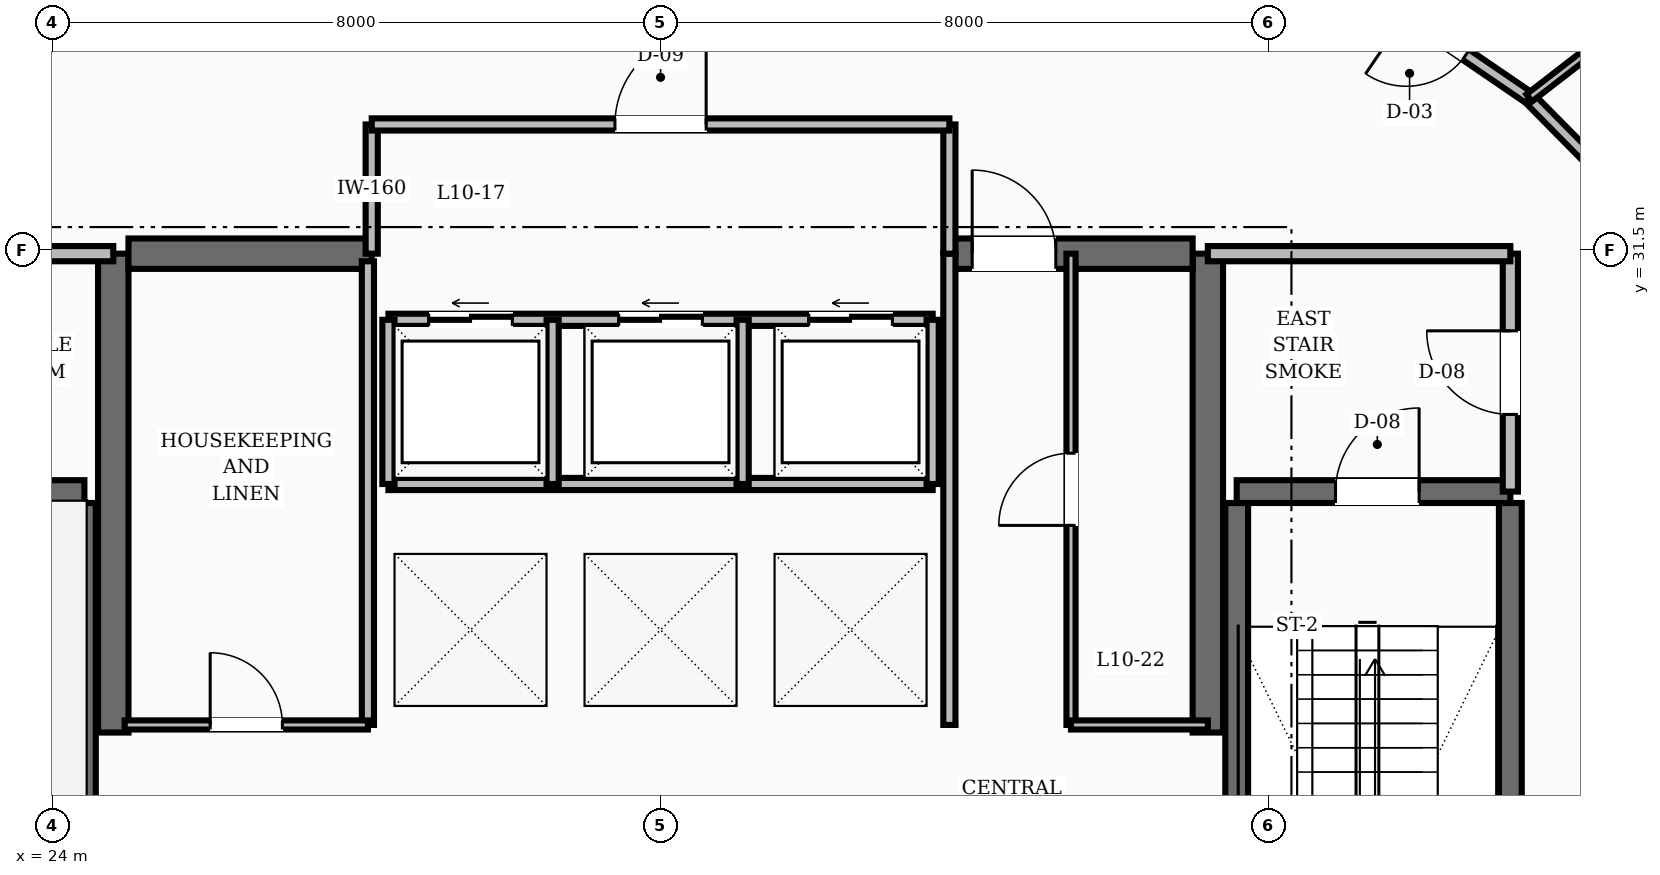
"""IFC4 building model, lengths in metres.
Left out: names, types, materials, properties, quantities, classifications, styles, units other than length and angle.
Written with IfcOpenShell. Run it as: python <this file> out.ifc"""

import sys

from ifc_helpers import new_model, si_unit, direction, frame, frame_2d, origin, place, context, subcontext, project, spatial, rectangle, extrude, element, fill, save


model = new_model("IFC4")
c1 = context("Model", 3, precision=1e-05, world=origin(), true_north=direction((0.0, 1.0)))
c2 = subcontext(c1, "Body", "Model", "MODEL_VIEW")
j1 = project(units=[si_unit("LENGTHUNIT", "METRE"), si_unit("PLANEANGLEUNIT", "RADIAN")], contexts=[c1])
p1 = place(None, origin())
s1 = spatial("IfcSite", under=j1, at=p1, CompositionType="ELEMENT")
p2 = place(p1, origin())
s2 = spatial("IfcBuilding", under=s1, at=p2, CompositionType="ELEMENT")
p3 = place(p2, frame((0.0, 0.0, 44.8)))
s3 = spatial("IfcBuildingStorey", under=s2, at=p3, CompositionType="ELEMENT", Elevation=44.8)
for number, where, z_axis, x_axis in (
    (1, (24.8, 25.15, 0.0), (0.0, 0.0, 1.0), (0.0, 1.0, 0.0)),
    (2, (39.2, 25.15, 0.0), (0.0, 0.0, 1.0), (0.0, 1.0, 0.0)),
):
    element("IfcWall", number, at=place(p3, frame(where, z_axis=z_axis, x_axis=x_axis)), inside=s3, PredefinedType="SHEAR", context=c2, shape_type="SweptSolid", body=[
        extrude(rectangle(XDim=6.3, YDim=0.4, at=frame_2d((3.15, 0.0))), origin(), (0.0, 0.0, 1.0), 3.6),
    ])
p4 = place(p3, frame((25.0, 31.45, 0.0), z_axis=(0.0, 0.0, 1.0), x_axis=(1.0, 0.0, 0.0)))
e3 = element("IfcWall", 3, at=p4, inside=s3, PredefinedType="SHEAR", context=c2, shape_type="SweptSolid", body=[
    extrude(rectangle(XDim=3.2, YDim=0.4, at=frame_2d((1.6, 0.0))), origin(), (0.0, 0.0, 1.0), 3.6),
])
p5 = place(p3, frame((35.8, 31.45, 0.0), z_axis=(0.0, 0.0, 1.0), x_axis=(1.0, 0.0, 0.0)))
e4 = element("IfcWall", 4, at=p5, inside=s3, PredefinedType="SHEAR", context=c2, shape_type="SweptSolid", body=[
    extrude(rectangle(XDim=3.2, YDim=0.4, at=frame_2d((1.6, 0.0))), origin(), (0.0, 0.0, 1.0), 3.6),
])
p6 = place(p5, frame((0.3, 0.0, 0.0)))
e5 = element("IfcOpeningElement", 5, at=p6, cuts=e4, PredefinedType="OPENING", context=c2, shape_type="SweptSolid", body=[
    extrude(rectangle(XDim=1.1, YDim=2.1, at=frame_2d((0.55, 1.05))), frame((0.0, 0.21, 0.0), z_axis=(0.0, -1.0, 0.0), x_axis=(1.0, 0.0, 0.0)), (0.0, 0.0, 1.0), 0.42),
])
p7 = place(p3, frame((24.42, 19.43, 0.0), z_axis=(0.0, 0.0, 1.0), x_axis=(0.0, 1.0, 0.0)))
e6 = element("IfcWall", 6, at=p7, inside=s3, PredefinedType="SHEAR", context=c2, shape_type="SweptSolid", body=[
    extrude(rectangle(XDim=8.74, YDim=0.3, at=frame_2d((4.37, 0.0))), origin(), (0.0, 0.0, 1.0), 3.6),
])
p8 = place(p3, frame((20.82, 28.32, 0.0), z_axis=(0.0, 0.0, 1.0), x_axis=(1.0, 0.0, 0.0)))
e7 = element("IfcWall", 7, at=p8, inside=s3, PredefinedType="SHEAR", context=c2, shape_type="SweptSolid", body=[
    extrude(rectangle(XDim=3.6, YDim=0.3, at=frame_2d((1.8, 0.0))), origin(), (0.0, 0.0, 1.0), 3.6),
])
for number, where, z_axis, x_axis in (
    (8, (43.18, 19.43, 0.0), (0.0, 0.0, 1.0), (0.0, 1.0, 0.0)),
    (9, (39.58, 19.43, 0.0), (0.0, 0.0, 1.0), (0.0, 1.0, 0.0)),
):
    element("IfcWall", number, at=place(p3, frame(where, z_axis=z_axis, x_axis=x_axis)), inside=s3, PredefinedType="SHEAR", context=c2, shape_type="SweptSolid", body=[
        extrude(rectangle(XDim=8.74, YDim=0.3, at=frame_2d((4.37, 0.0))), origin(), (0.0, 0.0, 1.0), 3.6),
    ])
p9 = place(p3, frame((39.58, 28.32, 0.0), z_axis=(0.0, 0.0, 1.0), x_axis=(1.0, 0.0, 0.0)))
e10 = element("IfcWall", 10, at=p9, inside=s3, PredefinedType="SHEAR", context=c2, shape_type="SweptSolid", body=[
    extrude(rectangle(XDim=3.6, YDim=0.3, at=frame_2d((1.8, 0.0))), origin(), (0.0, 0.0, 1.0), 3.6),
])
p10 = place(p9, frame((1.3, 0.0, 0.0)))
e11 = element("IfcOpeningElement", 11, at=p10, cuts=e10, PredefinedType="OPENING", context=c2, shape_type="SweptSolid", body=[
    extrude(rectangle(XDim=1.1, YDim=2.1, at=frame_2d((0.55, 1.05))), frame((0.0, 0.16, 0.0), z_axis=(0.0, -1.0, 0.0), x_axis=(1.0, 0.0, 0.0)), (0.0, 0.0, 1.0), 0.32),
])
p11 = place(p3, frame((43.18, 28.32, 0.0), z_axis=(0.0, 0.0, 1.0), x_axis=(0.0, 1.0, 0.0)))
e12 = element("IfcWall", 12, at=p11, inside=s3, PredefinedType="SOLIDWALL", context=c2, shape_type="SweptSolid", body=[
    extrude(rectangle(XDim=3.13, YDim=0.2, at=frame_2d((1.565, 0.0))), origin(), (0.0, 0.0, 1.0), 2.61),
])
p12 = place(p11, frame((1.015, 0.0, 0.0)))
e13 = element("IfcOpeningElement", 13, at=p12, cuts=e12, PredefinedType="OPENING", context=c2, shape_type="SweptSolid", body=[
    extrude(rectangle(XDim=1.1, YDim=2.1, at=frame_2d((0.55, 1.05))), frame((0.0, 0.11, 0.0), z_axis=(0.0, -1.0, 0.0), x_axis=(1.0, 0.0, 0.0)), (0.0, 0.0, 1.0), 0.22),
])
for number, where, z_axis, x_axis in (
    (14, (39.2, 31.45, 0.0), (0.0, 0.0, 1.0), (1.0, 0.0, 0.0)),
    (15, (20.82, 31.45, 0.0), (0.0, 0.0, 1.0), (1.0, 0.0, 0.0)),
):
    element("IfcWall", number, at=place(p3, frame(where, z_axis=z_axis, x_axis=x_axis)), inside=s3, PredefinedType="SOLIDWALL", context=c2, shape_type="SweptSolid", body=[
        extrude(rectangle(XDim=3.98, YDim=0.2, at=frame_2d((1.99, 0.0))), origin(), (0.0, 0.0, 1.0), 2.61),
    ])
p13 = place(p3, frame((35.8, 25.25, 0.0), z_axis=(0.0, 0.0, 1.0), x_axis=(0.0, 1.0, 0.0)))
e16 = element("IfcWall", 16, at=p13, inside=s3, PredefinedType="SOLIDWALL", context=c2, shape_type="SweptSolid", body=[
    extrude(rectangle(XDim=6.2, YDim=0.16, at=frame_2d((3.1, 0.0))), origin(), (0.0, 0.0, 1.0), 2.61),
])
p14 = place(p3, frame((28.42, 30.58, 0.0), z_axis=(0.0, 0.0, 1.0), x_axis=(1.0, 0.0, 0.0)))
e17 = element("IfcWall", 17, at=p14, inside=s3, PredefinedType="SOLIDWALL", context=c2, shape_type="SweptSolid", body=[
    extrude(rectangle(XDim=7.16, YDim=0.16, at=frame_2d((3.58, 0.0))), origin(), (0.0, 0.0, 1.0), 2.61),
])
p15 = place(p14, frame((0.53, 0.0, 0.0)))
e18 = element("IfcOpeningElement", 18, at=p15, cuts=e17, PredefinedType="OPENING", context=c2, shape_type="SweptSolid", body=[
    extrude(rectangle(XDim=1.1, YDim=2.15, at=frame_2d((0.55, 1.075))), frame((0.0, 0.09, 0.0), z_axis=(0.0, -1.0, 0.0), x_axis=(1.0, 0.0, 0.0)), (0.0, 0.0, 1.0), 0.18),
])
p16 = place(p14, frame((3.03, 0.0, 0.0)))
e19 = element("IfcOpeningElement", 19, at=p16, cuts=e17, PredefinedType="OPENING", context=c2, shape_type="SweptSolid", body=[
    extrude(rectangle(XDim=1.1, YDim=2.15, at=frame_2d((0.55, 1.075))), frame((0.0, 0.09, 0.0), z_axis=(0.0, -1.0, 0.0), x_axis=(1.0, 0.0, 0.0)), (0.0, 0.0, 1.0), 0.18),
])
p17 = place(p14, frame((5.53, 0.0, 0.0)))
e20 = element("IfcOpeningElement", 20, at=p17, cuts=e17, PredefinedType="OPENING", context=c2, shape_type="SweptSolid", body=[
    extrude(rectangle(XDim=1.1, YDim=2.15, at=frame_2d((0.55, 1.075))), frame((0.0, 0.09, 0.0), z_axis=(0.0, -1.0, 0.0), x_axis=(1.0, 0.0, 0.0)), (0.0, 0.0, 1.0), 0.18),
])
p18 = place(p3, frame((28.42, 28.42, 0.0), z_axis=(0.0, 0.0, 1.0), x_axis=(1.0, 0.0, 0.0)))
e21 = element("IfcWall", 21, at=p18, inside=s3, PredefinedType="SOLIDWALL", context=c2, shape_type="SweptSolid", body=[
    extrude(rectangle(XDim=7.16, YDim=0.16, at=frame_2d((3.58, 0.0))), origin(), (0.0, 0.0, 1.0), 2.61),
])
for number, where, z_axis, x_axis in (
    (22, (28.42, 28.42, 0.0), (0.0, 0.0, 1.0), (0.0, 1.0, 0.0)),
    (23, (30.58, 28.42, 0.0), (0.0, 0.0, 1.0), (0.0, 1.0, 0.0)),
    (24, (33.08, 28.42, 0.0), (0.0, 0.0, 1.0), (0.0, 1.0, 0.0)),
    (25, (35.58, 28.42, 0.0), (0.0, 0.0, 1.0), (0.0, 1.0, 0.0)),
):
    element("IfcWall", number, at=place(p3, frame(where, z_axis=z_axis, x_axis=x_axis)), inside=s3, PredefinedType="SOLIDWALL", context=c2, shape_type="SweptSolid", body=[
        extrude(rectangle(XDim=2.16, YDim=0.16, at=frame_2d((1.08, 0.0))), origin(), (0.0, 0.0, 1.0), 2.61),
    ])
for number, where, z_axis, x_axis in (
    (26, (28.2, 31.45, 0.0), (0.0, 0.0, 1.0), (0.0, 1.0, 0.0)),
    (27, (35.8, 31.45, 0.0), (0.0, 0.0, 1.0), (0.0, 1.0, 0.0)),
):
    element("IfcWall", number, at=place(p3, frame(where, z_axis=z_axis, x_axis=x_axis)), inside=s3, PredefinedType="SOLIDWALL", context=c2, shape_type="SweptSolid", body=[
        extrude(rectangle(XDim=1.7, YDim=0.16, at=frame_2d((0.85, 0.0))), origin(), (0.0, 0.0, 1.0), 2.61),
    ])
p19 = place(p3, frame((28.2, 33.15, 0.0), z_axis=(0.0, 0.0, 1.0), x_axis=(1.0, 0.0, 0.0)))
e28 = element("IfcWall", 28, at=p19, inside=s3, PredefinedType="SOLIDWALL", context=c2, shape_type="SweptSolid", body=[
    extrude(rectangle(XDim=7.6, YDim=0.16, at=frame_2d((3.8, 0.0))), origin(), (0.0, 0.0, 1.0), 2.61),
])
p20 = place(p19, frame((3.2, 0.0, 0.0)))
e29 = element("IfcOpeningElement", 29, at=p20, cuts=e28, PredefinedType="OPENING", context=c2, shape_type="SweptSolid", body=[
    extrude(rectangle(XDim=1.2, YDim=2.1, at=frame_2d((0.6, 1.05))), frame((0.0, 0.09, 0.0), z_axis=(0.0, -1.0, 0.0), x_axis=(1.0, 0.0, 0.0)), (0.0, 0.0, 1.0), 0.18),
])
p21 = place(p3, frame((28.15, 25.25, 0.0), z_axis=(0.0, 0.0, 1.0), x_axis=(0.0, 1.0, 0.0)))
e30 = element("IfcWall", 30, at=p21, inside=s3, PredefinedType="SOLIDWALL", context=c2, shape_type="SweptSolid", body=[
    extrude(rectangle(XDim=6.1, YDim=0.16, at=frame_2d((3.05, 0.0))), origin(), (0.0, 0.0, 1.0), 2.61),
])
p22 = place(p3, frame((24.95, 25.25, 0.0), z_axis=(0.0, 0.0, 1.0), x_axis=(1.0, 0.0, 0.0)))
e31 = element("IfcWall", 31, at=p22, inside=s3, PredefinedType="PARTITIONING", context=c2, shape_type="SweptSolid", body=[
    extrude(rectangle(XDim=3.2, YDim=0.12, at=frame_2d((1.6, 0.0))), origin(), (0.0, 0.0, 1.0), 2.61),
])
p23 = place(p22, frame((1.125, 0.0, 0.0)))
e32 = element("IfcOpeningElement", 32, at=p23, cuts=e31, PredefinedType="OPENING", context=c2, shape_type="SweptSolid", body=[
    extrude(rectangle(XDim=0.95, YDim=2.1, at=frame_2d((0.475, 1.05))), frame((0.0, 0.07, 0.0), z_axis=(0.0, -1.0, 0.0), x_axis=(1.0, 0.0, 0.0)), (0.0, 0.0, 1.0), 0.14),
])
p24 = place(p3, frame((37.4, 25.25, 0.0), z_axis=(0.0, 0.0, 1.0), x_axis=(0.0, 1.0, 0.0)))
e33 = element("IfcWall", 33, at=p24, inside=s3, PredefinedType="PARTITIONING", context=c2, shape_type="SweptSolid", body=[
    extrude(rectangle(XDim=6.2, YDim=0.12, at=frame_2d((3.1, 0.0))), origin(), (0.0, 0.0, 1.0), 2.61),
])
p25 = place(p24, frame((2.625, 0.0, 0.0)))
e34 = element("IfcOpeningElement", 34, at=p25, cuts=e33, PredefinedType="OPENING", context=c2, shape_type="SweptSolid", body=[
    extrude(rectangle(XDim=0.95, YDim=2.1, at=frame_2d((0.475, 1.05))), frame((0.0, 0.07, 0.0), z_axis=(0.0, -1.0, 0.0), x_axis=(1.0, 0.0, 0.0)), (0.0, 0.0, 1.0), 0.14),
])
p26 = place(p3, frame((37.4, 25.25, 0.0), z_axis=(0.0, 0.0, 1.0), x_axis=(1.0, 0.0, 0.0)))
e35 = element("IfcWall", 35, at=p26, inside=s3, PredefinedType="PARTITIONING", context=c2, shape_type="SweptSolid", body=[
    extrude(rectangle(XDim=1.8, YDim=0.12, at=frame_2d((0.9, 0.0))), origin(), (0.0, 0.0, 1.0), 2.61),
])
p27 = place(p3, frame((45.438, 31.463, 0.0), z_axis=(0.0, 0.0, 1.0), x_axis=(-0.702569520063, 0.711615113301, 0.0)))
e36 = element("IfcWall", 36, at=p27, inside=s3, PredefinedType="SOLIDWALL", context=c2, shape_type="SweptSolid", body=[
    extrude(rectangle(XDim=2.861, YDim=0.16, at=frame_2d((1.43, 0.0))), origin(), (0.0, 0.0, 1.0), 2.61),
])
p28 = place(p3, frame((43.428, 33.499, 0.0), z_axis=(0.0, 0.0, 1.0), x_axis=(-0.826112340767, 0.563505457323, 0.0)))
e37 = element("IfcWall", 37, at=p28, inside=s3, PredefinedType="SOLIDWALL", context=c2, shape_type="SweptSolid", body=[
    extrude(rectangle(XDim=2.965, YDim=0.16, at=frame_2d((1.482, 0.0))), origin(), (0.0, 0.0, 1.0), 2.61),
])
p29 = place(p28, frame((1.007, 0.0, 0.0)))
e38 = element("IfcOpeningElement", 38, at=p29, cuts=e37, PredefinedType="OPENING", context=c2, shape_type="SweptSolid", body=[
    extrude(rectangle(XDim=0.95, YDim=2.1, at=frame_2d((0.475, 1.05))), frame((0.0, 0.09, 0.0), z_axis=(0.0, -1.0, 0.0), x_axis=(1.0, 0.0, 0.0)), (0.0, 0.0, 1.0), 0.18),
])
p30 = place(p3, frame((43.428, 33.499, 0.0), z_axis=(0.0, 0.0, 1.0), x_axis=(0.79102015288, 0.611790092873, 0.0)))
e39 = element("IfcWall", 39, at=p30, inside=s3, PredefinedType="PARTITIONING", context=c2, shape_type="SweptSolid", body=[
    extrude(rectangle(XDim=3.407, YDim=0.12, at=frame_2d((1.703, 0.0))), origin(), (0.0, 0.0, 1.0), 2.61),
])
p31 = place(p10, origin())
e40 = element("IfcDoor", 40, at=p31, inside=s3, OperationType="SINGLE_SWING_RIGHT", PredefinedType="DOOR", context=c2, shape_type="SweptSolid", body=[
    extrude(rectangle(XDim=1.1, YDim=2.1, at=frame_2d((0.55, 1.05))), frame((0.0, 0.025, 0.0), z_axis=(0.0, -1.0, 0.0), x_axis=(1.0, 0.0, 0.0)), (0.0, 0.0, 1.0), 0.05),
])
fill(e11, e40)
p32 = place(p12, origin())
e41 = element("IfcDoor", 41, at=p32, inside=s3, OperationType="SINGLE_SWING_RIGHT", PredefinedType="DOOR", context=c2, shape_type="SweptSolid", body=[
    extrude(rectangle(XDim=1.1, YDim=2.1, at=frame_2d((0.55, 1.05))), frame((0.0, 0.025, 0.0), z_axis=(0.0, -1.0, 0.0), x_axis=(1.0, 0.0, 0.0)), (0.0, 0.0, 1.0), 0.05),
])
fill(e13, e41)
p33 = place(p6, origin())
e42 = element("IfcDoor", 42, at=p33, inside=s3, OperationType="SINGLE_SWING_LEFT", PredefinedType="DOOR", context=c2, shape_type="SweptSolid", body=[
    extrude(rectangle(XDim=1.1, YDim=2.1, at=frame_2d((0.55, 1.05))), frame((0.0, 0.025, 0.0), z_axis=(0.0, -1.0, 0.0), x_axis=(1.0, 0.0, 0.0)), (0.0, 0.0, 1.0), 0.05),
])
fill(e5, e42)
p34 = place(p15, origin())
e43 = element("IfcDoor", 43, at=p34, inside=s3, OperationType="SLIDING_TO_LEFT", PredefinedType="DOOR", context=c2, shape_type="SweptSolid", body=[
    extrude(rectangle(XDim=1.1, YDim=2.15, at=frame_2d((0.55, 1.075))), frame((0.0, 0.025, 0.0), z_axis=(0.0, -1.0, 0.0), x_axis=(1.0, 0.0, 0.0)), (0.0, 0.0, 1.0), 0.05),
])
fill(e18, e43)
p35 = place(p16, origin())
e44 = element("IfcDoor", 44, at=p35, inside=s3, OperationType="SLIDING_TO_LEFT", PredefinedType="DOOR", context=c2, shape_type="SweptSolid", body=[
    extrude(rectangle(XDim=1.1, YDim=2.15, at=frame_2d((0.55, 1.075))), frame((0.0, 0.025, 0.0), z_axis=(0.0, -1.0, 0.0), x_axis=(1.0, 0.0, 0.0)), (0.0, 0.0, 1.0), 0.05),
])
fill(e19, e44)
p36 = place(p17, origin())
e45 = element("IfcDoor", 45, at=p36, inside=s3, OperationType="SLIDING_TO_LEFT", PredefinedType="DOOR", context=c2, shape_type="SweptSolid", body=[
    extrude(rectangle(XDim=1.1, YDim=2.15, at=frame_2d((0.55, 1.075))), frame((0.0, 0.025, 0.0), z_axis=(0.0, -1.0, 0.0), x_axis=(1.0, 0.0, 0.0)), (0.0, 0.0, 1.0), 0.05),
])
fill(e20, e45)
p37 = place(p20, origin())
e46 = element("IfcDoor", 46, at=p37, inside=s3, OperationType="SINGLE_SWING_RIGHT", PredefinedType="DOOR", context=c2, shape_type="SweptSolid", body=[
    extrude(rectangle(XDim=1.2, YDim=2.1, at=frame_2d((0.6, 1.05))), frame((0.0, 0.025, 0.0), z_axis=(0.0, -1.0, 0.0), x_axis=(1.0, 0.0, 0.0)), (0.0, 0.0, 1.0), 0.05),
])
fill(e29, e46)
p38 = place(p23, origin())
e47 = element("IfcDoor", 47, at=p38, inside=s3, OperationType="SINGLE_SWING_LEFT", PredefinedType="DOOR", context=c2, shape_type="SweptSolid", body=[
    extrude(rectangle(XDim=0.95, YDim=2.1, at=frame_2d((0.475, 1.05))), frame((0.0, 0.025, 0.0), z_axis=(0.0, -1.0, 0.0), x_axis=(1.0, 0.0, 0.0)), (0.0, 0.0, 1.0), 0.05),
])
fill(e32, e47)
p39 = place(p25, origin())
e48 = element("IfcDoor", 48, at=p39, inside=s3, OperationType="SINGLE_SWING_LEFT", PredefinedType="DOOR", context=c2, shape_type="SweptSolid", body=[
    extrude(rectangle(XDim=0.95, YDim=2.1, at=frame_2d((0.475, 1.05))), frame((0.0, 0.025, 0.0), z_axis=(0.0, -1.0, 0.0), x_axis=(1.0, 0.0, 0.0)), (0.0, 0.0, 1.0), 0.05),
])
fill(e34, e48)
p40 = place(p29, origin())
e49 = element("IfcDoor", 49, at=p40, inside=s3, OperationType="SINGLE_SWING_RIGHT", PredefinedType="DOOR", context=c2, shape_type="SweptSolid", body=[
    extrude(rectangle(XDim=0.95, YDim=2.1, at=frame_2d((0.475, 1.05))), frame((0.0, 0.025, 0.0), z_axis=(0.0, -1.0, 0.0), x_axis=(1.0, 0.0, 0.0)), (0.0, 0.0, 1.0), 0.05),
])
fill(e38, e49)
save(model, sys.argv[1])
